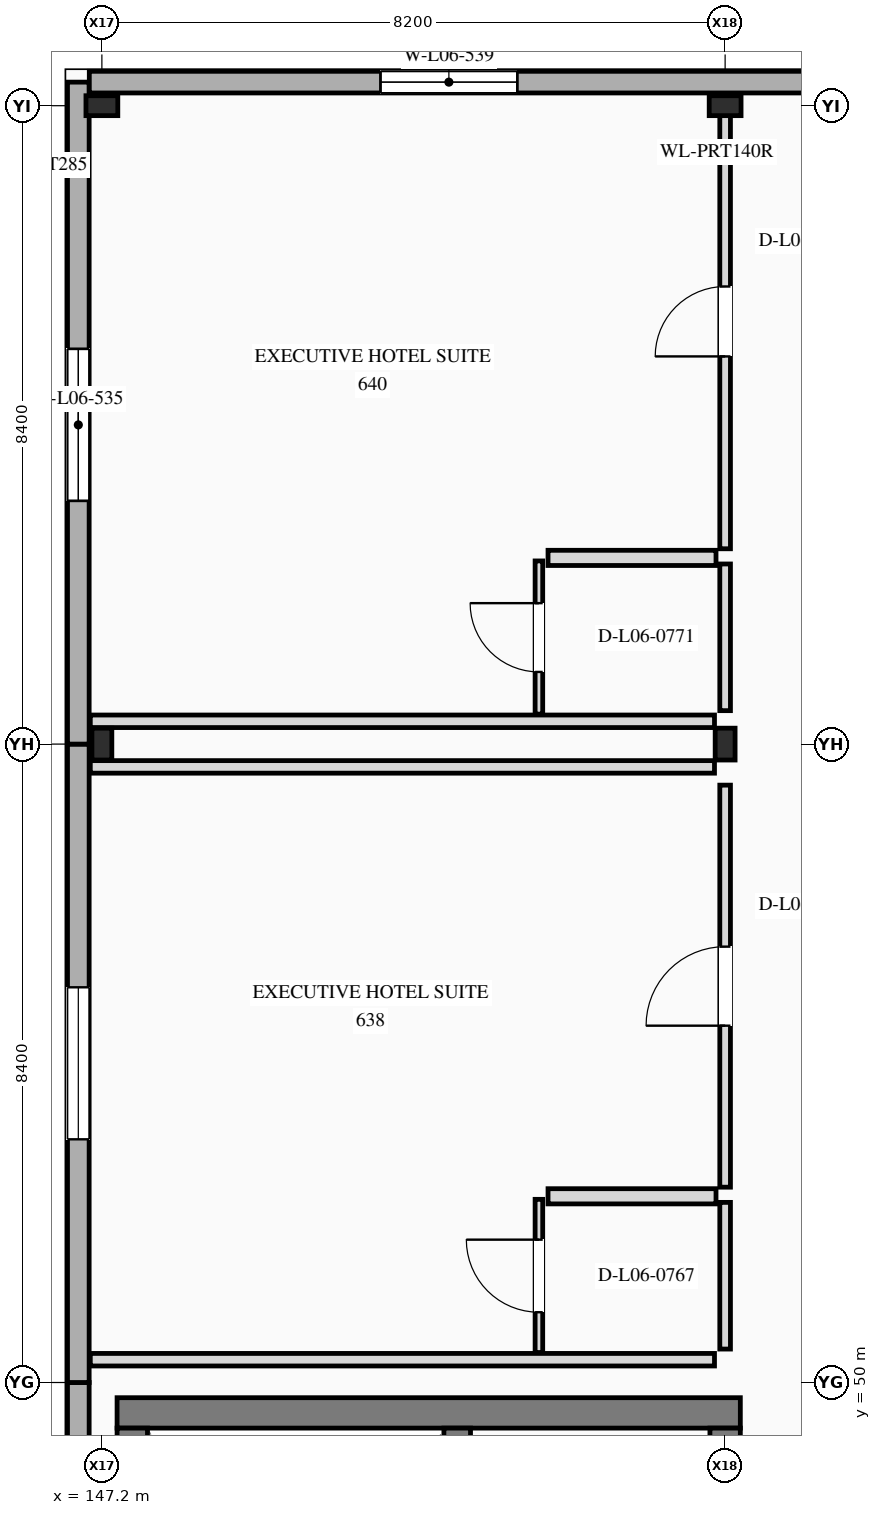
"""IFC4 building model, lengths in metres.
Left out: names, types, materials, properties, quantities, classifications, styles, units other than length and angle.
Written with IfcOpenShell. Run it as: python <this file> out.ifc"""

import sys

from ifc_helpers import new_model, si_unit, direction, frame, frame_2d, origin, origin_2d, place, context, subcontext, project, spatial, rectangle, i_section, extrude, element, fill, save


model = new_model("IFC4")
c1 = context("Model", 3, precision=1e-05, world=origin(), true_north=direction((0.0, 1.0)))
c2 = subcontext(c1, "Body", "Model", "MODEL_VIEW")
j1 = project(units=[si_unit("LENGTHUNIT", "METRE"), si_unit("PLANEANGLEUNIT", "RADIAN")], contexts=[c1])
p1 = place(None, origin())
s1 = spatial("IfcSite", under=j1, at=p1, CompositionType="ELEMENT")
p2 = place(p1, origin())
s2 = spatial("IfcBuilding", under=s1, at=p2, CompositionType="ELEMENT")
p3 = place(p2, frame((0.0, 0.0, 27.0)))
s3 = spatial("IfcBuildingStorey", under=s2, at=p3, CompositionType="ELEMENT", Elevation=27.0)
for number, where, z_axis, x_axis in (
    (1, (147.2, 58.4, 0.0), (0.0, 0.0, 1.0), (1.0, 0.0, 0.0)),
    (2, (147.2, 66.8, 0.0), (0.0, 0.0, 1.0), (0.0, 1.0, 0.0)),
    (3, (155.4, 58.4, 0.0), (0.0, 0.0, 1.0), (1.0, 0.0, 0.0)),
    (4, (155.4, 66.8, 0.0), (0.0, 0.0, 1.0), (0.0, 1.0, 0.0)),
):
    element("IfcColumn", number, at=place(p3, frame(where, z_axis=z_axis, x_axis=x_axis)), inside=s3, PredefinedType="COLUMN", context=c2, shape_type="SweptSolid", body=[
        extrude(i_section(OverallWidth=0.262, OverallDepth=0.419, WebThickness=0.012, FlangeThickness=0.019, at=origin_2d()), origin(), (0.0, 0.0, 1.0), 3.6),
    ])
p4 = place(p3, frame((146.89, 41.6, 0.0), z_axis=(0.0, 0.0, 1.0), x_axis=(0.0, 1.0, 0.0)))
e5 = element("IfcWall", 5, at=p4, inside=s3, PredefinedType="STANDARD", context=c2, shape_type="SweptSolid", body=[
    extrude(rectangle(XDim=8.4, YDim=0.285, at=frame_2d((4.2, 0.0))), origin(), (0.0, 0.0, 1.0), 3.6),
])
p5 = place(p3, frame((146.89, 50.0, 0.0), z_axis=(0.0, 0.0, 1.0), x_axis=(0.0, 1.0, 0.0)))
e6 = element("IfcWall", 6, at=p5, inside=s3, PredefinedType="STANDARD", context=c2, shape_type="SweptSolid", body=[
    extrude(rectangle(XDim=8.4, YDim=0.285, at=frame_2d((4.2, 0.0))), origin(), (0.0, 0.0, 1.0), 3.6),
])
p6 = place(p5, frame((3.2, 0.0, 0.85)))
e7 = element("IfcOpeningElement", 7, at=p6, cuts=e6, PredefinedType="OPENING", context=c2, shape_type="SweptSolid", body=[
    extrude(rectangle(XDim=2.0, YDim=1.65, at=frame_2d((1.0, 0.825))), frame((0.0, 0.152, 0.0), z_axis=(0.0, -1.0, 0.0), x_axis=(1.0, 0.0, 0.0)), (0.0, 0.0, 1.0), 0.305),
])
p7 = place(p3, frame((146.89, 58.4, 0.0), z_axis=(0.0, 0.0, 1.0), x_axis=(0.0, 1.0, 0.0)))
e8 = element("IfcWall", 8, at=p7, inside=s3, PredefinedType="STANDARD", context=c2, shape_type="SweptSolid", body=[
    extrude(rectangle(XDim=8.71, YDim=0.285, at=frame_2d((4.355, 0.0))), origin(), (0.0, 0.0, 1.0), 3.6),
])
p8 = place(p7, frame((3.2, 0.0, 0.85)))
e9 = element("IfcOpeningElement", 9, at=p8, cuts=e8, PredefinedType="OPENING", context=c2, shape_type="SweptSolid", body=[
    extrude(rectangle(XDim=2.0, YDim=1.65, at=frame_2d((1.0, 0.825))), frame((0.0, 0.152, 0.0), z_axis=(0.0, -1.0, 0.0), x_axis=(1.0, 0.0, 0.0)), (0.0, 0.0, 1.0), 0.305),
])
p9 = place(p3, frame((166.166, 67.11, 0.0), z_axis=(0.0, 0.0, 1.0), x_axis=(-1.0, 0.0, 0.0)))
e10 = element("IfcWall", 10, at=p9, inside=s3, PredefinedType="STANDARD", context=c2, shape_type="SweptSolid", body=[
    extrude(rectangle(XDim=19.131, YDim=0.285, at=frame_2d((9.565, 0.0))), origin(), (0.0, 0.0, 1.0), 3.6),
])
p10 = place(p9, frame((3.2, 0.0, 0.88)))
e11 = element("IfcOpeningElement", 11, at=p10, cuts=e10, PredefinedType="OPENING", context=c2, shape_type="SweptSolid", body=[
    extrude(rectangle(XDim=1.8, YDim=1.8, at=frame_2d((0.9, 0.9))), frame((0.0, 0.152, 0.0), z_axis=(0.0, -1.0, 0.0), x_axis=(1.0, 0.0, 0.0)), (0.0, 0.0, 1.0), 0.305),
])
p11 = place(p9, frame((13.5, 0.0, 0.88)))
e12 = element("IfcOpeningElement", 12, at=p11, cuts=e10, PredefinedType="OPENING", context=c2, shape_type="SweptSolid", body=[
    extrude(rectangle(XDim=1.8, YDim=1.8, at=frame_2d((0.9, 0.9))), frame((0.0, 0.152, 0.0), z_axis=(0.0, -1.0, 0.0), x_axis=(1.0, 0.0, 0.0)), (0.0, 0.0, 1.0), 0.305),
])
p12 = place(p3, frame((155.6, 49.6, 0.0), z_axis=(0.0, 0.0, 1.0), x_axis=(-1.0, 0.0, 0.0)))
e13 = element("IfcWall", 13, at=p12, inside=s3, PredefinedType="SHEAR", context=c2, shape_type="SweptSolid", body=[
    extrude(rectangle(XDim=8.2, YDim=0.4, at=frame_2d((4.1, 0.0))), origin(), (0.0, 0.0, 1.0), 3.6),
])
p13 = place(p3, frame((147.6, 49.4, 0.0), z_axis=(0.0, 0.0, 1.0), x_axis=(0.0, -1.0, 0.0)))
e14 = element("IfcWall", 14, at=p13, inside=s3, PredefinedType="SHEAR", context=c2, shape_type="SweptSolid", body=[
    extrude(rectangle(XDim=9.4, YDim=0.4, at=frame_2d((4.7, 0.0))), origin(), (0.0, 0.0, 1.0), 3.6),
])
p14 = place(p3, frame((155.4, 40.0, 0.0), z_axis=(0.0, 0.0, 1.0), x_axis=(0.0, 1.0, 0.0)))
e15 = element("IfcWall", 15, at=p14, inside=s3, PredefinedType="SHEAR", context=c2, shape_type="SweptSolid", body=[
    extrude(rectangle(XDim=9.4, YDim=0.4, at=frame_2d((4.7, 0.0))), origin(), (0.0, 0.0, 1.0), 3.6),
])
p15 = place(p14, frame((1.05, 0.0, 0.0)))
e16 = element("IfcOpeningElement", 16, at=p15, cuts=e15, PredefinedType="OPENING", context=c2, shape_type="SweptSolid", body=[
    extrude(rectangle(XDim=1.1, YDim=2.2, at=frame_2d((0.55, 1.1))), frame((0.0, 0.21, 0.0), z_axis=(0.0, -1.0, 0.0), x_axis=(1.0, 0.0, 0.0)), (0.0, 0.0, 1.0), 0.42),
])
p16 = place(p14, frame((3.95, 0.0, 0.0)))
e17 = element("IfcOpeningElement", 17, at=p16, cuts=e15, PredefinedType="OPENING", context=c2, shape_type="SweptSolid", body=[
    extrude(rectangle(XDim=1.1, YDim=2.2, at=frame_2d((0.55, 1.1))), frame((0.0, 0.21, 0.0), z_axis=(0.0, -1.0, 0.0), x_axis=(1.0, 0.0, 0.0)), (0.0, 0.0, 1.0), 0.42),
])
p17 = place(p14, frame((6.875, 0.0, 0.0)))
e18 = element("IfcOpeningElement", 18, at=p17, cuts=e15, PredefinedType="OPENING", context=c2, shape_type="SweptSolid", body=[
    extrude(rectangle(XDim=1.35, YDim=2.3, at=frame_2d((0.675, 1.15))), frame((0.0, 0.21, 0.0), z_axis=(0.0, -1.0, 0.0), x_axis=(1.0, 0.0, 0.0)), (0.0, 0.0, 1.0), 0.42),
])
p18 = place(p3, frame((151.875, 40.0, 0.0), z_axis=(0.0, 0.0, 1.0), x_axis=(0.0, 1.0, 0.0)))
e19 = element("IfcWall", 19, at=p18, inside=s3, PredefinedType="SHEAR", context=c2, shape_type="SweptSolid", body=[
    extrude(rectangle(XDim=9.4, YDim=0.35, at=frame_2d((4.7, 0.0))), origin(), (0.0, 0.0, 1.0), 3.6),
])
p19 = place(p3, frame((155.4, 50.44, 0.0), z_axis=(0.0, 0.0, 1.0), x_axis=(0.0, 1.0, 0.0)))
e20 = element("IfcWall", 20, at=p19, inside=s3, PredefinedType="PARTITIONING", context=c2, shape_type="SweptSolid", body=[
    extrude(rectangle(XDim=1.93, YDim=0.14, at=frame_2d((0.965, 0.0))), origin(), (0.0, 0.0, 1.0), 2.68),
])
p20 = place(p3, frame((155.4, 52.57, 0.0), z_axis=(0.0, 0.0, 1.0), x_axis=(0.0, 1.0, 0.0)))
e21 = element("IfcWall", 21, at=p20, inside=s3, PredefinedType="PARTITIONING", context=c2, shape_type="SweptSolid", body=[
    extrude(rectangle(XDim=5.29, YDim=0.14, at=frame_2d((2.645, 0.0))), origin(), (0.0, 0.0, 1.0), 2.68),
])
p21 = place(p20, frame((2.125, 0.0, 0.0)))
e22 = element("IfcOpeningElement", 22, at=p21, cuts=e21, PredefinedType="OPENING", context=c2, shape_type="SweptSolid", body=[
    extrude(rectangle(XDim=1.04, YDim=2.4, at=frame_2d((0.52, 1.2))), frame((0.0, 0.08, 0.0), z_axis=(0.0, -1.0, 0.0), x_axis=(1.0, 0.0, 0.0)), (0.0, 0.0, 1.0), 0.16),
])
p22 = place(p3, frame((147.048, 50.3, 0.0), z_axis=(0.0, 0.0, 1.0), x_axis=(1.0, 0.0, 0.0)))
e23 = element("IfcWall", 23, at=p22, inside=s3, PredefinedType="PARTITIONING", context=c2, shape_type="SweptSolid", body=[
    extrude(rectangle(XDim=8.212, YDim=0.165, at=frame_2d((4.106, 0.0))), origin(), (0.0, 0.0, 1.0), 3.29),
])
p23 = place(p3, frame((147.048, 58.1, 0.0), z_axis=(0.0, 0.0, 1.0), x_axis=(1.0, 0.0, 0.0)))
e24 = element("IfcWall", 24, at=p23, inside=s3, PredefinedType="PARTITIONING", context=c2, shape_type="SweptSolid", body=[
    extrude(rectangle(XDim=8.212, YDim=0.165, at=frame_2d((4.106, 0.0))), origin(), (0.0, 0.0, 1.0), 2.703),
])
p24 = place(p3, frame((153.07, 52.45, 0.0), z_axis=(0.0, 0.0, 1.0), x_axis=(1.0, 0.0, 0.0)))
e25 = element("IfcWall", 25, at=p24, inside=s3, PredefinedType="PLUMBINGWALL", context=c2, shape_type="SweptSolid", body=[
    extrude(rectangle(XDim=2.21, YDim=0.2, at=frame_2d((1.105, 0.0))), origin(), (0.0, 0.0, 1.0), 3.29),
])
p25 = place(p3, frame((152.95, 50.395, 0.0), z_axis=(0.0, 0.0, 1.0), x_axis=(0.0, 1.0, 0.0)))
e26 = element("IfcWall", 26, at=p25, inside=s3, PredefinedType="PARTITIONING", context=c2, shape_type="SweptSolid", body=[
    extrude(rectangle(XDim=2.015, YDim=0.1, at=frame_2d((1.008, 0.0))), origin(), (0.0, 0.0, 1.0), 3.29),
])
p26 = place(p25, frame((0.53, 0.0, 0.0)))
e27 = element("IfcOpeningElement", 27, at=p26, cuts=e26, PredefinedType="OPENING", context=c2, shape_type="SweptSolid", body=[
    extrude(rectangle(XDim=0.955, YDim=2.14, at=frame_2d((0.478, 1.07))), frame((0.0, 0.06, 0.0), z_axis=(0.0, -1.0, 0.0), x_axis=(1.0, 0.0, 0.0)), (0.0, 0.0, 1.0), 0.12),
])
p27 = place(p3, frame((155.4, 58.84, 0.0), z_axis=(0.0, 0.0, 1.0), x_axis=(0.0, 1.0, 0.0)))
e28 = element("IfcWall", 28, at=p27, inside=s3, PredefinedType="PARTITIONING", context=c2, shape_type="SweptSolid", body=[
    extrude(rectangle(XDim=1.93, YDim=0.14, at=frame_2d((0.965, 0.0))), origin(), (0.0, 0.0, 1.0), 2.764),
])
p28 = place(p3, frame((155.4, 60.97, 0.0), z_axis=(0.0, 0.0, 1.0), x_axis=(0.0, 1.0, 0.0)))
e29 = element("IfcWall", 29, at=p28, inside=s3, PredefinedType="PARTITIONING", context=c2, shape_type="SweptSolid", body=[
    extrude(rectangle(XDim=5.982, YDim=0.14, at=frame_2d((2.991, 0.0))), origin(), (0.0, 0.0, 1.0), 2.703),
])
p29 = place(p28, frame((2.531, 0.0, 0.0)))
e30 = element("IfcOpeningElement", 30, at=p29, cuts=e29, PredefinedType="OPENING", context=c2, shape_type="SweptSolid", body=[
    extrude(rectangle(XDim=0.92, YDim=2.15, at=frame_2d((0.46, 1.075))), frame((0.0, 0.08, 0.0), z_axis=(0.0, -1.0, 0.0), x_axis=(1.0, 0.0, 0.0)), (0.0, 0.0, 1.0), 0.16),
])
p30 = place(p3, frame((147.048, 58.7, 0.0), z_axis=(0.0, 0.0, 1.0), x_axis=(1.0, 0.0, 0.0)))
e31 = element("IfcWall", 31, at=p30, inside=s3, PredefinedType="PARTITIONING", context=c2, shape_type="SweptSolid", body=[
    extrude(rectangle(XDim=8.212, YDim=0.165, at=frame_2d((4.106, 0.0))), origin(), (0.0, 0.0, 1.0), 2.703),
])
p31 = place(p3, frame((153.07, 60.85, 0.0), z_axis=(0.0, 0.0, 1.0), x_axis=(1.0, 0.0, 0.0)))
e32 = element("IfcWall", 32, at=p31, inside=s3, PredefinedType="PLUMBINGWALL", context=c2, shape_type="SweptSolid", body=[
    extrude(rectangle(XDim=2.21, YDim=0.2, at=frame_2d((1.105, 0.0))), origin(), (0.0, 0.0, 1.0), 3.29),
])
p32 = place(p3, frame((152.95, 58.794, 0.0), z_axis=(0.0, 0.0, 1.0), x_axis=(0.0, 1.0, 0.0)))
e33 = element("IfcWall", 33, at=p32, inside=s3, PredefinedType="PARTITIONING", context=c2, shape_type="SweptSolid", body=[
    extrude(rectangle(XDim=2.016, YDim=0.1, at=frame_2d((1.008, 0.0))), origin(), (0.0, 0.0, 1.0), 2.898),
])
p33 = place(p32, frame((0.555, 0.0, 0.0)))
e34 = element("IfcOpeningElement", 34, at=p33, cuts=e33, PredefinedType="OPENING", context=c2, shape_type="SweptSolid", body=[
    extrude(rectangle(XDim=0.905, YDim=2.18, at=frame_2d((0.453, 1.09))), frame((0.0, 0.06, 0.0), z_axis=(0.0, -1.0, 0.0), x_axis=(1.0, 0.0, 0.0)), (0.0, 0.0, 1.0), 0.12),
])
p34 = place(p6, origin())
e35 = element("IfcWindow", 35, at=p34, inside=s3, PartitioningType="SINGLE_PANEL", PredefinedType="WINDOW", context=c2, shape_type="SweptSolid", body=[
    extrude(rectangle(XDim=2.0, YDim=1.65, at=frame_2d((1.0, 0.825))), frame((0.0, 0.03, 0.0), z_axis=(0.0, -1.0, 0.0), x_axis=(1.0, 0.0, 0.0)), (0.0, 0.0, 1.0), 0.06),
])
fill(e7, e35)
p35 = place(p8, origin())
e36 = element("IfcWindow", 36, at=p35, inside=s3, PartitioningType="SINGLE_PANEL", PredefinedType="WINDOW", context=c2, shape_type="SweptSolid", body=[
    extrude(rectangle(XDim=2.0, YDim=1.65, at=frame_2d((1.0, 0.825))), frame((0.0, 0.03, 0.0), z_axis=(0.0, -1.0, 0.0), x_axis=(1.0, 0.0, 0.0)), (0.0, 0.0, 1.0), 0.06),
])
fill(e9, e36)
p36 = place(p11, origin())
e37 = element("IfcWindow", 37, at=p36, inside=s3, PartitioningType="SINGLE_PANEL", PredefinedType="WINDOW", context=c2, shape_type="SweptSolid", body=[
    extrude(rectangle(XDim=1.8, YDim=1.8, at=frame_2d((0.9, 0.9))), frame((0.0, 0.03, 0.0), z_axis=(0.0, -1.0, 0.0), x_axis=(1.0, 0.0, 0.0)), (0.0, 0.0, 1.0), 0.06),
])
fill(e12, e37)
p37 = place(p21, origin())
e38 = element("IfcDoor", 38, at=p37, inside=s3, OperationType="SINGLE_SWING_LEFT", PredefinedType="DOOR", context=c2, shape_type="SweptSolid", body=[
    extrude(rectangle(XDim=1.04, YDim=2.4, at=frame_2d((0.52, 1.2))), frame((0.0, 0.025, 0.0), z_axis=(0.0, -1.0, 0.0), x_axis=(1.0, 0.0, 0.0)), (0.0, 0.0, 1.0), 0.05),
])
fill(e22, e38)
p38 = place(p26, origin())
e39 = element("IfcDoor", 39, at=p38, inside=s3, OperationType="SINGLE_SWING_RIGHT", PredefinedType="DOOR", context=c2, shape_type="SweptSolid", body=[
    extrude(rectangle(XDim=0.955, YDim=2.14, at=frame_2d((0.478, 1.07))), frame((0.0, 0.025, 0.0), z_axis=(0.0, -1.0, 0.0), x_axis=(1.0, 0.0, 0.0)), (0.0, 0.0, 1.0), 0.05),
])
fill(e27, e39)
p39 = place(p29, origin())
e40 = element("IfcDoor", 40, at=p39, inside=s3, OperationType="SINGLE_SWING_LEFT", PredefinedType="DOOR", context=c2, shape_type="SweptSolid", body=[
    extrude(rectangle(XDim=0.92, YDim=2.15, at=frame_2d((0.46, 1.075))), frame((0.0, 0.025, 0.0), z_axis=(0.0, -1.0, 0.0), x_axis=(1.0, 0.0, 0.0)), (0.0, 0.0, 1.0), 0.05),
])
fill(e30, e40)
p40 = place(p33, origin())
e41 = element("IfcDoor", 41, at=p40, inside=s3, OperationType="SINGLE_SWING_RIGHT", PredefinedType="DOOR", context=c2, shape_type="SweptSolid", body=[
    extrude(rectangle(XDim=0.905, YDim=2.18, at=frame_2d((0.453, 1.09))), frame((0.0, 0.025, 0.0), z_axis=(0.0, -1.0, 0.0), x_axis=(1.0, 0.0, 0.0)), (0.0, 0.0, 1.0), 0.05),
])
fill(e34, e41)
save(model, sys.argv[1])
